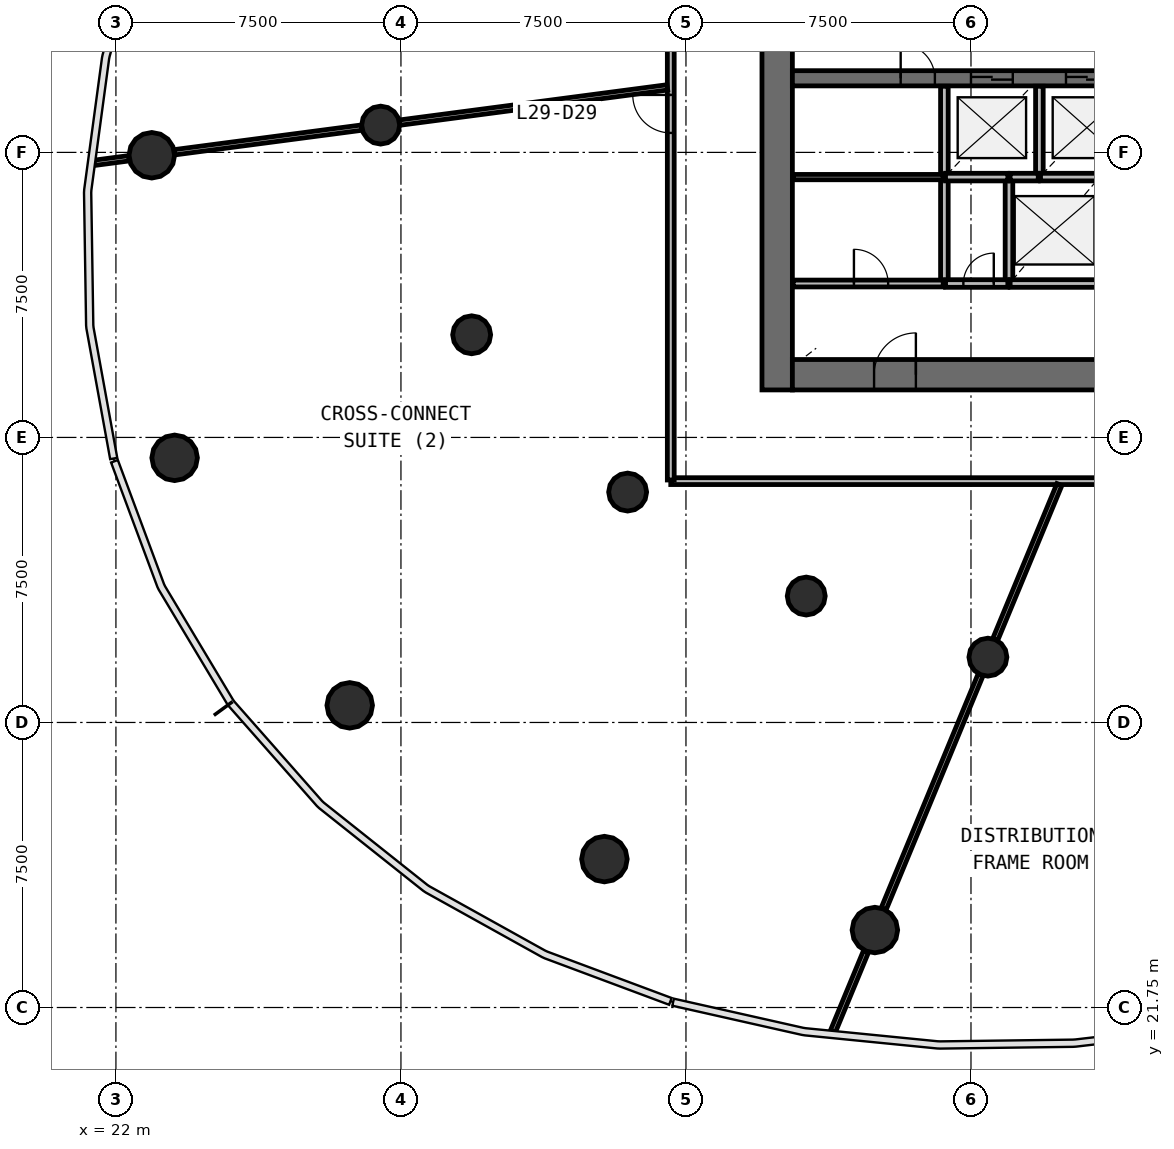
"""IFC4 building model, lengths in metres.
Left out: names, types, materials, properties, quantities, classifications, styles, units other than length and angle.
Written with IfcOpenShell. Run it as: python <this file> out.ifc"""

import sys

from ifc_helpers import new_model, si_unit, direction, frame, frame_2d, origin, origin_2d, place, context, subcontext, project, spatial, rectangle, circle, extrude, source, transform, mapped, element, fill, save


model = new_model("IFC4")
c1 = context("Model", 3, precision=1e-05, world=origin(), true_north=direction((0.0, 1.0)))
c2 = subcontext(c1, "Body", "Model", "MODEL_VIEW")
j1 = project(units=[si_unit("LENGTHUNIT", "METRE"), si_unit("PLANEANGLEUNIT", "RADIAN")], contexts=[c1])
p1 = place(None, origin())
s1 = spatial("IfcSite", under=j1, at=p1, CompositionType="ELEMENT")
p2 = place(p1, origin())
s2 = spatial("IfcBuilding", under=s1, at=p2, CompositionType="ELEMENT")
p3 = place(p2, frame((0.0, 0.0, 124.9)))
s3 = spatial("IfcBuildingStorey", under=s2, at=p3, CompositionType="ELEMENT", Elevation=124.9)
p4 = place(p3, frame((39.4, 58.0, 0.0), z_axis=(0.0, 0.0, 1.0), x_axis=(0.0, -1.0, 0.0)))
e1 = element("IfcWall", 1, at=p4, inside=s3, PredefinedType="SHEAR", context=c2, shape_type="SweptSolid", body=[
    extrude(rectangle(XDim=20.0, YDim=0.8, at=frame_2d((10.0, 0.0))), origin(), (0.0, 0.0, 1.0), 4.1),
])
p5 = place(p4, frame((9.1, 0.0, 0.0)))
e2 = element("IfcOpeningElement", 2, at=p5, cuts=e1, PredefinedType="OPENING", context=c2, shape_type="SweptSolid", body=[
    extrude(rectangle(XDim=1.8, YDim=2.1, at=frame_2d((0.9, 1.05))), frame((0.0, 0.41, 0.0), z_axis=(0.0, -1.0, 0.0), x_axis=(1.0, 0.0, 0.0)), (0.0, 0.0, 1.0), 0.82),
])
p6 = place(p3, frame((39.8, 38.4, 0.0), z_axis=(0.0, 0.0, 1.0), x_axis=(1.0, 0.0, 0.0)))
e3 = element("IfcWall", 3, at=p6, inside=s3, PredefinedType="SHEAR", context=c2, shape_type="SweptSolid", body=[
    extrude(rectangle(XDim=24.4, YDim=0.8, at=frame_2d((12.2, 0.0))), origin(), (0.0, 0.0, 1.0), 4.1),
])
p7 = place(p6, frame((21.65, 0.0, 0.0)))
e4 = element("IfcOpeningElement", 4, at=p7, cuts=e3, PredefinedType="OPENING", context=c2, shape_type="SweptSolid", body=[
    extrude(rectangle(XDim=1.1, YDim=2.1, at=frame_2d((0.55, 1.05))), frame((0.0, 0.41, 0.0), z_axis=(0.0, -1.0, 0.0), x_axis=(1.0, 0.0, 0.0)), (0.0, 0.0, 1.0), 0.82),
])
p8 = place(p6, frame((2.15, 0.0, 0.0)))
e5 = element("IfcOpeningElement", 5, at=p8, cuts=e3, PredefinedType="OPENING", context=c2, shape_type="SweptSolid", body=[
    extrude(rectangle(XDim=1.1, YDim=2.1, at=frame_2d((0.55, 1.05))), frame((0.0, 0.41, 0.0), z_axis=(0.0, -1.0, 0.0), x_axis=(1.0, 0.0, 0.0)), (0.0, 0.0, 1.0), 0.82),
])
p9 = place(p3, frame((39.8, 46.2, 0.0), z_axis=(0.0, 0.0, 1.0), x_axis=(1.0, 0.0, 0.0)))
e6 = element("IfcWall", 6, at=p9, inside=s3, PredefinedType="SHEAR", context=c2, shape_type="SweptSolid", body=[
    extrude(rectangle(XDim=24.4, YDim=0.4, at=frame_2d((12.2, 0.0))), origin(), (0.0, 0.0, 1.0), 4.1),
])
p10 = place(p9, frame((4.7, 0.0, 0.0)))
e7 = element("IfcOpeningElement", 7, at=p10, cuts=e6, PredefinedType="OPENING", context=c2, shape_type="SweptSolid", body=[
    extrude(rectangle(XDim=1.1, YDim=2.1, at=frame_2d((0.55, 1.05))), frame((0.0, 0.21, 0.0), z_axis=(0.0, -1.0, 0.0), x_axis=(1.0, 0.0, 0.0)), (0.0, 0.0, 1.0), 0.42),
])
p11 = place(p9, frame((7.2, 0.0, 0.0)))
e8 = element("IfcOpeningElement", 8, at=p11, cuts=e6, PredefinedType="OPENING", context=c2, shape_type="SweptSolid", body=[
    extrude(rectangle(XDim=1.1, YDim=2.1, at=frame_2d((0.55, 1.05))), frame((0.0, 0.21, 0.0), z_axis=(0.0, -1.0, 0.0), x_axis=(1.0, 0.0, 0.0)), (0.0, 0.0, 1.0), 0.42),
])
p12 = place(p9, frame((9.7, 0.0, 0.0)))
e9 = element("IfcOpeningElement", 9, at=p12, cuts=e6, PredefinedType="OPENING", context=c2, shape_type="SweptSolid", body=[
    extrude(rectangle(XDim=1.1, YDim=2.1, at=frame_2d((0.55, 1.05))), frame((0.0, 0.21, 0.0), z_axis=(0.0, -1.0, 0.0), x_axis=(1.0, 0.0, 0.0)), (0.0, 0.0, 1.0), 0.42),
])
p13 = place(p9, frame((20.65, 0.0, 0.0)))
e10 = element("IfcOpeningElement", 10, at=p13, cuts=e6, PredefinedType="OPENING", context=c2, shape_type="SweptSolid", body=[
    extrude(rectangle(XDim=0.9, YDim=2.1, at=frame_2d((0.45, 1.05))), frame((0.0, 0.21, 0.0), z_axis=(0.0, -1.0, 0.0), x_axis=(1.0, 0.0, 0.0)), (0.0, 0.0, 1.0), 0.42),
])
p14 = place(p9, frame((2.85, 0.0, 0.0)))
e11 = element("IfcOpeningElement", 11, at=p14, cuts=e6, PredefinedType="OPENING", context=c2, shape_type="SweptSolid", body=[
    extrude(rectangle(XDim=0.9, YDim=2.1, at=frame_2d((0.45, 1.05))), frame((0.0, 0.21, 0.0), z_axis=(0.0, -1.0, 0.0), x_axis=(1.0, 0.0, 0.0)), (0.0, 0.0, 1.0), 0.42),
])
p15 = place(p9, frame((11.85, 0.0, 0.0)))
e12 = element("IfcOpeningElement", 12, at=p15, cuts=e6, PredefinedType="OPENING", context=c2, shape_type="SweptSolid", body=[
    extrude(rectangle(XDim=0.9, YDim=2.1, at=frame_2d((0.45, 1.05))), frame((0.0, 0.21, 0.0), z_axis=(0.0, -1.0, 0.0), x_axis=(1.0, 0.0, 0.0)), (0.0, 0.0, 1.0), 0.42),
])
m1 = source(origin(), c2, "Body", "SweptSolid", [
    extrude(circle(Radius=0.6, at=origin_2d()), origin(), (0.0, 0.0, 1.0), 4.1),
])
for number, where, z_axis, x_axis in (
    (13, (22.944, 44.175, 0.0), (0.0, 0.0, 1.0), (1.0, 0.0, 0.0)),
    (14, (23.544, 36.213, 0.0), (0.0, 0.0, 1.0), (1.0, 0.0, 0.0)),
    (15, (28.152, 29.701, 0.0), (0.0, 0.0, 1.0), (1.0, 0.0, 0.0)),
    (16, (34.854, 25.655, 0.0), (0.0, 0.0, 1.0), (1.0, 0.0, 0.0)),
    (17, (41.971, 23.788, 0.0), (0.0, 0.0, 1.0), (1.0, 0.0, 0.0)),
):
    element("IfcColumn", number, at=place(p3, frame(where, z_axis=z_axis, x_axis=x_axis)), inside=s3, PredefinedType="COLUMN", context=c2, shape_type="MappedRepresentation", body=[
        mapped(m1, transform((0.0, 0.0, 0.0), scale=1.0)),
    ])
m2 = source(origin(), c2, "Body", "SweptSolid", [
    extrude(circle(Radius=0.5, at=origin_2d()), origin(), (0.0, 0.0, 1.0), 4.1),
])
for number, where, z_axis, x_axis in (
    (18, (28.966, 44.968, 0.0), (0.0, 0.0, 1.0), (1.0, 0.0, 0.0)),
    (19, (31.361, 39.451, 0.0), (0.0, 0.0, 1.0), (1.0, 0.0, 0.0)),
    (20, (35.465, 35.312, 0.0), (0.0, 0.0, 1.0), (1.0, 0.0, 0.0)),
    (21, (40.165, 32.576, 0.0), (0.0, 0.0, 1.0), (1.0, 0.0, 0.0)),
    (22, (44.945, 30.969, 0.0), (0.0, 0.0, 1.0), (1.0, 0.0, 0.0)),
):
    element("IfcColumn", number, at=place(p3, frame(where, z_axis=z_axis, x_axis=x_axis)), inside=s3, PredefinedType="COLUMN", context=c2, shape_type="MappedRepresentation", body=[
        mapped(m2, transform((0.0, 0.0, 0.0), scale=1.0)),
    ])
for number, where, z_axis, x_axis in (
    (23, (43.8, 43.6, 0.0), (0.0, 0.0, 1.0), (0.0, -1.0, 0.0)),
    (24, (45.5, 43.6, 0.0), (0.0, 0.0, 1.0), (0.0, -1.0, 0.0)),
):
    element("IfcWall", number, at=place(p3, frame(where, z_axis=z_axis, x_axis=x_axis)), inside=s3, PredefinedType="SOLIDWALL", context=c2, shape_type="SweptSolid", body=[
        extrude(rectangle(XDim=2.8, YDim=0.2, at=frame_2d((1.4, 0.0))), origin(), (0.0, 0.0, 1.0), 3.6),
    ])
p16 = place(p3, frame((45.53, 40.8, 0.0), z_axis=(0.0, 0.0, 1.0), x_axis=(1.0, 0.0, 0.0)))
e25 = element("IfcWall", 25, at=p16, inside=s3, PredefinedType="SOLIDWALL", context=c2, shape_type="SweptSolid", body=[
    extrude(rectangle(XDim=2.34, YDim=0.2, at=frame_2d((1.17, 0.0))), origin(), (0.0, 0.0, 1.0), 3.6),
])
p17 = place(p3, frame((43.8, 45.99, 0.0), z_axis=(0.0, 0.0, 1.0), x_axis=(0.0, -1.0, 0.0)))
e26 = element("IfcWall", 26, at=p17, inside=s3, PredefinedType="SOLIDWALL", context=c2, shape_type="SweptSolid", body=[
    extrude(rectangle(XDim=2.36, YDim=0.2, at=frame_2d((1.18, 0.0))), origin(), (0.0, 0.0, 1.0), 3.6),
])
p18 = place(p3, frame((46.3, 43.6, 0.0), z_axis=(0.0, 0.0, 1.0), x_axis=(0.0, 1.0, 0.0)))
e27 = element("IfcWall", 27, at=p18, inside=s3, PredefinedType="SOLIDWALL", context=c2, shape_type="SweptSolid", body=[
    extrude(rectangle(XDim=2.39, YDim=0.2, at=frame_2d((1.195, 0.0))), origin(), (0.0, 0.0, 1.0), 3.6),
])
p19 = place(p3, frame((43.83, 43.6, 0.0), z_axis=(0.0, 0.0, 1.0), x_axis=(1.0, 0.0, 0.0)))
e28 = element("IfcWall", 28, at=p19, inside=s3, PredefinedType="SOLIDWALL", context=c2, shape_type="SweptSolid", body=[
    extrude(rectangle(XDim=1.64, YDim=0.2, at=frame_2d((0.82, 0.0))), origin(), (0.0, 0.0, 1.0), 3.6),
])
p20 = place(p3, frame((43.83, 40.8, 0.0), z_axis=(0.0, 0.0, 1.0), x_axis=(1.0, 0.0, 0.0)))
e29 = element("IfcWall", 29, at=p20, inside=s3, PredefinedType="SOLIDWALL", context=c2, shape_type="SweptSolid", body=[
    extrude(rectangle(XDim=1.64, YDim=0.2, at=frame_2d((0.82, 0.0))), origin(), (0.0, 0.0, 1.0), 3.6),
])
p21 = place(p20, frame((0.47, 0.0, 0.0)))
e30 = element("IfcOpeningElement", 30, at=p21, cuts=e29, PredefinedType="OPENING", context=c2, shape_type="SweptSolid", body=[
    extrude(rectangle(XDim=0.8, YDim=2.1, at=frame_2d((0.4, 1.05))), frame((0.0, 0.11, 0.0), z_axis=(0.0, -1.0, 0.0), x_axis=(1.0, 0.0, 0.0)), (0.0, 0.0, 1.0), 0.22),
])
p22 = place(p3, frame((46.33, 43.6, 0.0), z_axis=(0.0, 0.0, 1.0), x_axis=(1.0, 0.0, 0.0)))
e31 = element("IfcWall", 31, at=p22, inside=s3, PredefinedType="SOLIDWALL", context=c2, shape_type="SweptSolid", body=[
    extrude(rectangle(XDim=1.54, YDim=0.2, at=frame_2d((0.77, 0.0))), origin(), (0.0, 0.0, 1.0), 3.6),
])
p23 = place(p3, frame((45.53, 43.6, 0.0), z_axis=(0.0, 0.0, 1.0), x_axis=(1.0, 0.0, 0.0)))
e32 = element("IfcWall", 32, at=p23, inside=s3, PredefinedType="SOLIDWALL", context=c2, shape_type="SweptSolid", body=[
    extrude(rectangle(XDim=0.74, YDim=0.2, at=frame_2d((0.37, 0.0))), origin(), (0.0, 0.0, 1.0), 3.6),
])
p24 = place(p3, frame((67.4, 35.6, 0.0), z_axis=(0.0, 0.0, 1.0), x_axis=(-1.0, 0.0, 0.0)))
e33 = element("IfcWall", 33, at=p24, inside=s3, PredefinedType="PARTITIONING", context=c2, shape_type="SweptSolid", body=[
    extrude(rectangle(XDim=30.8, YDim=0.18, at=frame_2d((15.4, 0.0))), origin(), (0.0, 0.0, 1.0), 2.8),
])
p25 = place(p24, frame((17.35, 0.0, 0.0)))
e34 = element("IfcOpeningElement", 34, at=p25, cuts=e33, PredefinedType="OPENING", context=c2, shape_type="SweptSolid", body=[
    extrude(rectangle(XDim=1.0, YDim=2.1, at=frame_2d((0.5, 1.05))), frame((0.0, 0.1, 0.0), z_axis=(0.0, -1.0, 0.0), x_axis=(1.0, 0.0, 0.0)), (0.0, 0.0, 1.0), 0.2),
])
p26 = place(p24, frame((14.95, 0.0, 0.0)))
e35 = element("IfcOpeningElement", 35, at=p26, cuts=e33, PredefinedType="OPENING", context=c2, shape_type="SweptSolid", body=[
    extrude(rectangle(XDim=1.0, YDim=2.1, at=frame_2d((0.5, 1.05))), frame((0.0, 0.1, 0.0), z_axis=(0.0, -1.0, 0.0), x_axis=(1.0, 0.0, 0.0)), (0.0, 0.0, 1.0), 0.2),
])
p27 = place(p24, frame((8.95, 0.0, 0.0)))
e36 = element("IfcOpeningElement", 36, at=p27, cuts=e33, PredefinedType="OPENING", context=c2, shape_type="SweptSolid", body=[
    extrude(rectangle(XDim=1.0, YDim=2.1, at=frame_2d((0.5, 1.05))), frame((0.0, 0.1, 0.0), z_axis=(0.0, -1.0, 0.0), x_axis=(1.0, 0.0, 0.0)), (0.0, 0.0, 1.0), 0.2),
])
p28 = place(p3, frame((36.6, 35.63, 0.0), z_axis=(0.0, 0.0, 1.0), x_axis=(0.0, 1.0, 0.0)))
e37 = element("IfcWall", 37, at=p28, inside=s3, PredefinedType="PARTITIONING", context=c2, shape_type="SweptSolid", body=[
    extrude(rectangle(XDim=23.583, YDim=0.18, at=frame_2d((11.791, 0.0))), origin(), (0.0, 0.0, 1.0), 2.8),
])
p29 = place(p28, frame((14.732, 0.0, 0.0)))
e38 = element("IfcOpeningElement", 38, at=p29, cuts=e37, PredefinedType="OPENING", context=c2, shape_type="SweptSolid", body=[
    extrude(rectangle(XDim=1.0, YDim=2.1, at=frame_2d((0.5, 1.05))), frame((0.0, 0.1, 0.0), z_axis=(0.0, -1.0, 0.0), x_axis=(1.0, 0.0, 0.0)), (0.0, 0.0, 1.0), 0.2),
])
p30 = place(p28, frame((11.333, 0.0, 0.0)))
e39 = element("IfcOpeningElement", 39, at=p30, cuts=e37, PredefinedType="OPENING", context=c2, shape_type="SweptSolid", body=[
    extrude(rectangle(XDim=1.0, YDim=2.1, at=frame_2d((0.5, 1.05))), frame((0.0, 0.1, 0.0), z_axis=(0.0, -1.0, 0.0), x_axis=(1.0, 0.0, 0.0)), (0.0, 0.0, 1.0), 0.2),
])
p31 = place(p28, frame((9.133, 0.0, 0.0)))
e40 = element("IfcOpeningElement", 40, at=p31, cuts=e37, PredefinedType="OPENING", context=c2, shape_type="SweptSolid", body=[
    extrude(rectangle(XDim=1.0, YDim=2.1, at=frame_2d((0.5, 1.05))), frame((0.0, 0.1, 0.0), z_axis=(0.0, -1.0, 0.0), x_axis=(1.0, 0.0, 0.0)), (0.0, 0.0, 1.0), 0.2),
])
p32 = place(p3, frame((39.82, 40.8, 0.0), z_axis=(0.0, 0.0, 1.0), x_axis=(1.0, 0.0, 0.0)))
e41 = element("IfcWall", 41, at=p32, inside=s3, PredefinedType="PARTITIONING", context=c2, shape_type="SweptSolid", body=[
    extrude(rectangle(XDim=3.95, YDim=0.18, at=frame_2d((1.975, 0.0))), origin(), (0.0, 0.0, 1.0), 3.6),
])
p33 = place(p32, frame((1.6, 0.0, 0.0)))
e42 = element("IfcOpeningElement", 42, at=p33, cuts=e41, PredefinedType="OPENING", context=c2, shape_type="SweptSolid", body=[
    extrude(rectangle(XDim=0.9, YDim=2.1, at=frame_2d((0.45, 1.05))), frame((0.0, 0.1, 0.0), z_axis=(0.0, -1.0, 0.0), x_axis=(1.0, 0.0, 0.0)), (0.0, 0.0, 1.0), 0.2),
])
p34 = place(p3, frame((36.51, 45.961, 0.0), z_axis=(0.0, 0.0, 1.0), x_axis=(-0.99144622305, -0.130515848849, 0.0)))
e43 = element("IfcWall", 43, at=p34, inside=s3, PredefinedType="PARTITIONING", context=c2, shape_type="SweptSolid", body=[
    extrude(rectangle(XDim=7.104, YDim=0.14, at=frame_2d((3.552, 0.0))), origin(), (0.0, 0.0, 1.0), 2.8),
])
p35 = place(p3, frame((44.752, 30.502, 0.0), z_axis=(0.0, 0.0, 1.0), x_axis=(-0.382696989205, -0.923873916968, 0.0)))
e44 = element("IfcWall", 44, at=p35, inside=s3, PredefinedType="PARTITIONING", context=c2, shape_type="SweptSolid", body=[
    extrude(rectangle(XDim=6.663, YDim=0.14, at=frame_2d((3.332, 0.0))), origin(), (0.0, 0.0, 1.0), 2.8),
])
p36 = place(p3, frame((28.466, 44.902, 0.0), z_axis=(0.0, 0.0, 1.0), x_axis=(-0.991443414541, -0.130537181533, 0.0)))
e45 = element("IfcWall", 45, at=p36, inside=s3, PredefinedType="PARTITIONING", context=c2, shape_type="SweptSolid", body=[
    extrude(rectangle(XDim=4.966, YDim=0.14, at=frame_2d((2.483, 0.0))), origin(), (0.0, 0.0, 1.0), 2.8),
])
p37 = place(p3, frame((46.826, 35.51, 0.0), z_axis=(0.0, 0.0, 1.0), x_axis=(-0.382672831764, -0.923883923353, 0.0)))
e46 = element("IfcWall", 46, at=p37, inside=s3, PredefinedType="PARTITIONING", context=c2, shape_type="SweptSolid", body=[
    extrude(rectangle(XDim=4.41, YDim=0.14, at=frame_2d((2.205, 0.0))), origin(), (0.0, 0.0, 1.0), 2.8),
])
p38 = place(p3, frame((43.77, 43.6, 0.0), z_axis=(0.0, 0.0, 1.0), x_axis=(-1.0, 0.0, 0.0)))
e47 = element("IfcWall", 47, at=p38, inside=s3, PredefinedType="PARTITIONING", context=c2, shape_type="SweptSolid", body=[
    extrude(rectangle(XDim=3.95, YDim=0.14, at=frame_2d((1.975, 0.0))), origin(), (0.0, 0.0, 1.0), 2.8),
])
p39 = place(p3, frame((41.74, 23.229, 0.0), z_axis=(0.0, 0.0, 1.0), x_axis=(-0.382697386614, -0.923873752348, 0.0)))
e48 = element("IfcWall", 48, at=p39, inside=s3, PredefinedType="PARTITIONING", context=c2, shape_type="SweptSolid", body=[
    extrude(rectangle(XDim=2.288, YDim=0.14, at=frame_2d((1.144, 0.0))), origin(), (0.0, 0.0, 1.0), 2.8),
])
p40 = place(p3, frame((22.344, 44.096, 0.0), z_axis=(0.0, 0.0, 1.0), x_axis=(-0.991460558593, -0.130406904551, 0.0)))
e49 = element("IfcWall", 49, at=p40, inside=s3, PredefinedType="PARTITIONING", context=c2, shape_type="SweptSolid", body=[
    extrude(rectangle(XDim=0.928, YDim=0.14, at=frame_2d((0.464, 0.0))), origin(), (0.0, 0.0, 1.0), 2.8),
])
m3 = source(origin(), c2, "Body", "SweptSolid", [
    extrude(rectangle(XDim=1.1, YDim=2.1, at=frame_2d((0.55, 1.05))), frame((0.0, 0.025, 0.0), z_axis=(0.0, -1.0, 0.0), x_axis=(1.0, 0.0, 0.0)), (0.0, 0.0, 1.0), 0.05),
])
p41 = place(p10, origin())
e50 = element("IfcDoor", 50, at=p41, inside=s3, OperationType="DOUBLE_DOOR_SLIDING", PredefinedType="USERDEFINED", context=c2, shape_type="MappedRepresentation", body=[
    mapped(m3, transform((0.0, 0.0, 0.0), scale=1.0)),
])
fill(e7, e50)
p42 = place(p11, origin())
e51 = element("IfcDoor", 51, at=p42, inside=s3, OperationType="DOUBLE_DOOR_SLIDING", PredefinedType="USERDEFINED", context=c2, shape_type="MappedRepresentation", body=[
    mapped(m3, transform((0.0, 0.0, 0.0), scale=1.0)),
])
fill(e8, e51)
m4 = source(origin(), c2, "Body", "SweptSolid", [
    extrude(rectangle(XDim=0.8, YDim=2.1, at=frame_2d((0.4, 1.05))), frame((0.0, 0.025, 0.0), z_axis=(0.0, -1.0, 0.0), x_axis=(1.0, 0.0, 0.0)), (0.0, 0.0, 1.0), 0.05),
])
p43 = place(p21, origin())
e52 = element("IfcDoor", 52, at=p43, inside=s3, OperationType="SINGLE_SWING_RIGHT", PredefinedType="DOOR", context=c2, shape_type="MappedRepresentation", body=[
    mapped(m4, transform((0.0, 0.0, 0.0), scale=1.0)),
])
fill(e30, e52)
m5 = source(origin(), c2, "Body", "SweptSolid", [
    extrude(rectangle(XDim=1.1, YDim=2.1, at=frame_2d((0.55, 1.05))), frame((0.0, 0.025, 0.0), z_axis=(0.0, -1.0, 0.0), x_axis=(1.0, 0.0, 0.0)), (0.0, 0.0, 1.0), 0.05),
])
p44 = place(p8, origin())
e53 = element("IfcDoor", 53, at=p44, inside=s3, OperationType="SINGLE_SWING_RIGHT", PredefinedType="DOOR", context=c2, shape_type="MappedRepresentation", body=[
    mapped(m5, transform((0.0, 0.0, 0.0), scale=1.0)),
])
fill(e5, e53)
m6 = source(origin(), c2, "Body", "SweptSolid", [
    extrude(rectangle(XDim=1.0, YDim=2.1, at=frame_2d((0.5, 1.05))), frame((0.0, 0.025, 0.0), z_axis=(0.0, -1.0, 0.0), x_axis=(1.0, 0.0, 0.0)), (0.0, 0.0, 1.0), 0.05),
])
p45 = place(p31, origin())
e54 = element("IfcDoor", 54, at=p45, inside=s3, OperationType="SINGLE_SWING_RIGHT", PredefinedType="DOOR", context=c2, shape_type="MappedRepresentation", body=[
    mapped(m6, transform((0.0, 0.0, 0.0), scale=1.0)),
])
fill(e40, e54)
m7 = source(origin(), c2, "Body", "SweptSolid", [
    extrude(rectangle(XDim=0.9, YDim=2.1, at=frame_2d((0.45, 1.05))), frame((0.0, 0.025, 0.0), z_axis=(0.0, -1.0, 0.0), x_axis=(1.0, 0.0, 0.0)), (0.0, 0.0, 1.0), 0.05),
])
p46 = place(p33, origin())
e55 = element("IfcDoor", 55, at=p46, inside=s3, OperationType="SINGLE_SWING_LEFT", PredefinedType="DOOR", context=c2, shape_type="MappedRepresentation", body=[
    mapped(m7, transform((0.0, 0.0, 0.0), scale=1.0)),
])
fill(e42, e55)
p47 = place(p14, origin())
e56 = element("IfcDoor", 56, at=p47, inside=s3, OperationType="SINGLE_SWING_LEFT", PredefinedType="DOOR", context=c2, shape_type="MappedRepresentation", body=[
    mapped(m7, transform((0.0, 0.0, 0.0), scale=1.0)),
])
fill(e11, e56)
save(model, sys.argv[1])
